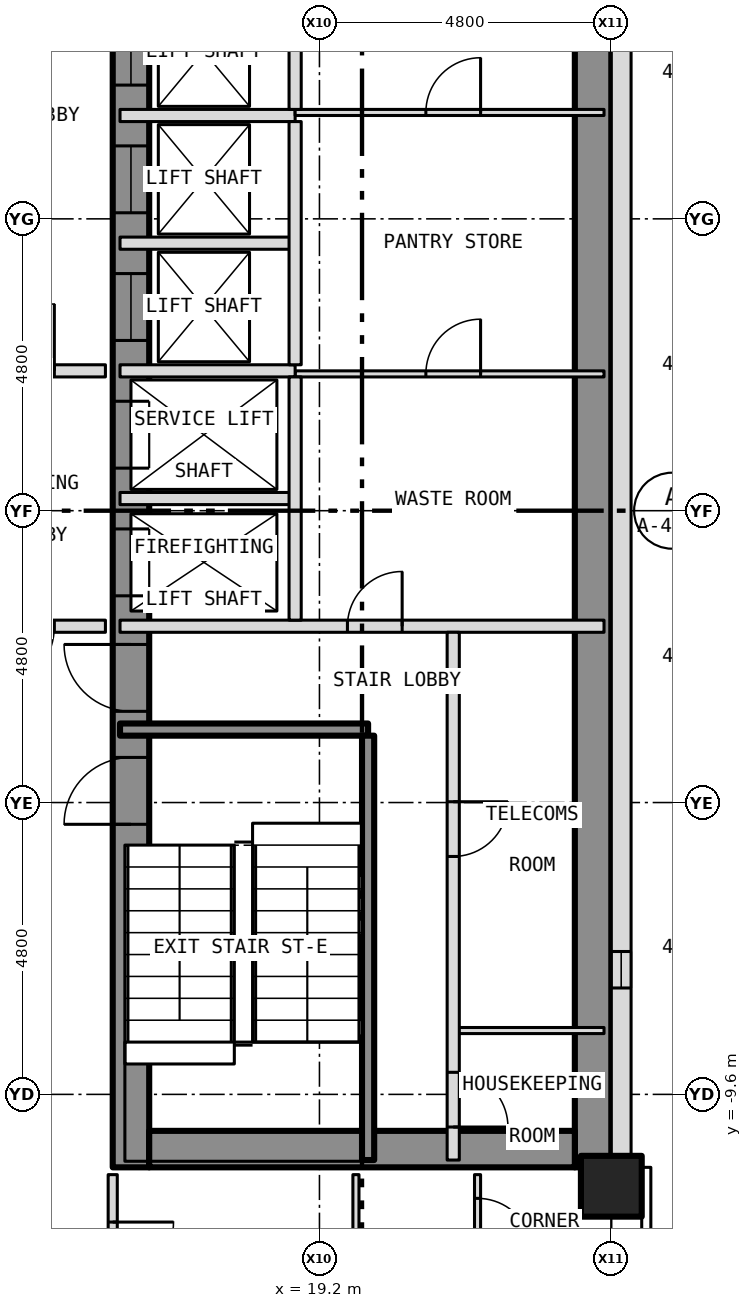
"""IFC4 building model, lengths in metres.
Left out: names, types, materials, properties, quantities, classifications, styles, units other than length and angle.
Written with IfcOpenShell. Run it as: python <this file> out.ifc"""

import sys

from ifc_helpers import new_model, si_unit, direction, frame, frame_2d, origin, origin_2d, place, context, subcontext, project, spatial, rectangle, hollow_rectangle, extrude, element, fill, save


model = new_model("IFC4")
c1 = context("Model", 3, precision=1e-05, world=origin(), true_north=direction((0.0, 1.0)))
c2 = subcontext(c1, "Body", "Model", "MODEL_VIEW")
j1 = project(units=[si_unit("LENGTHUNIT", "METRE"), si_unit("PLANEANGLEUNIT", "RADIAN")], contexts=[c1])
p1 = place(None, origin())
s1 = spatial("IfcSite", under=j1, at=p1, CompositionType="ELEMENT")
p2 = place(p1, origin())
s2 = spatial("IfcBuilding", under=s1, at=p2, CompositionType="ELEMENT")
p3 = place(p2, frame((0.0, 0.0, 60.0)))
s3 = spatial("IfcBuildingStorey", under=s2, at=p3, CompositionType="ELEMENT", Elevation=60.0)
p4 = place(p3, frame((24.0, -11.111, -0.15), z_axis=(0.0, 0.0, 1.0), x_axis=(1.0, 0.0, 0.0)))
e1 = element("IfcColumn", 1, at=p4, inside=s3, PredefinedType="COLUMN", context=c2, shape_type="SweptSolid", body=[
    extrude(hollow_rectangle(XDim=1.0, YDim=1.0, WallThickness=0.06, at=origin_2d()), origin(), (0.0, 0.0, 1.0), 3.5),
])
p5 = place(p3, frame((16.1, -10.8, 0.0), z_axis=(0.0, 0.0, 1.0), x_axis=(0.0, 1.0, 0.0)))
e2 = element("IfcWall", 2, at=p5, inside=s3, PredefinedType="SHEAR", context=c2, shape_type="SweptSolid", body=[
    extrude(rectangle(XDim=21.6, YDim=0.6, at=frame_2d((10.8, 0.0))), origin(), (0.0, 0.0, 1.0), 3.25),
])
p6 = place(p5, frame((9.4, 0.0, 0.0)))
e3 = element("IfcOpeningElement", 3, at=p6, cuts=e2, PredefinedType="OPENING", context=c2, shape_type="SweptSolid", body=[
    extrude(rectangle(XDim=1.1, YDim=2.1, at=frame_2d((0.55, 1.05))), frame((0.0, 0.312, 0.0), z_axis=(0.0, -1.0, 0.0), x_axis=(1.0, 0.0, 0.0)), (0.0, 0.0, 1.0), 0.624),
])
p7 = place(p5, frame((11.5, 0.0, 0.0)))
e4 = element("IfcOpeningElement", 4, at=p7, cuts=e2, PredefinedType="OPENING", context=c2, shape_type="SweptSolid", body=[
    extrude(rectangle(XDim=1.1, YDim=2.1, at=frame_2d((0.55, 1.05))), frame((0.0, 0.312, 0.0), z_axis=(0.0, -1.0, 0.0), x_axis=(1.0, 0.0, 0.0)), (0.0, 0.0, 1.0), 0.624),
])
p8 = place(p5, frame((13.6, 0.0, 0.0)))
e5 = element("IfcOpeningElement", 5, at=p8, cuts=e2, PredefinedType="OPENING", context=c2, shape_type="SweptSolid", body=[
    extrude(rectangle(XDim=1.1, YDim=2.1, at=frame_2d((0.55, 1.05))), frame((0.0, 0.312, 0.0), z_axis=(0.0, -1.0, 0.0), x_axis=(1.0, 0.0, 0.0)), (0.0, 0.0, 1.0), 0.624),
])
p9 = place(p5, frame((15.7, 0.0, 0.0)))
e6 = element("IfcOpeningElement", 6, at=p9, cuts=e2, PredefinedType="OPENING", context=c2, shape_type="SweptSolid", body=[
    extrude(rectangle(XDim=1.1, YDim=2.1, at=frame_2d((0.55, 1.05))), frame((0.0, 0.312, 0.0), z_axis=(0.0, -1.0, 0.0), x_axis=(1.0, 0.0, 0.0)), (0.0, 0.0, 1.0), 0.624),
])
p10 = place(p5, frame((17.8, 0.0, 0.0)))
e7 = element("IfcOpeningElement", 7, at=p10, cuts=e2, PredefinedType="OPENING", context=c2, shape_type="SweptSolid", body=[
    extrude(rectangle(XDim=1.1, YDim=2.1, at=frame_2d((0.55, 1.05))), frame((0.0, 0.312, 0.0), z_axis=(0.0, -1.0, 0.0), x_axis=(1.0, 0.0, 0.0)), (0.0, 0.0, 1.0), 0.624),
])
p11 = place(p5, frame((5.642, 0.0, 0.0)))
e8 = element("IfcOpeningElement", 8, at=p11, cuts=e2, PredefinedType="OPENING", context=c2, shape_type="SweptSolid", body=[
    extrude(rectangle(XDim=1.1, YDim=2.1, at=frame_2d((0.55, 1.05))), frame((0.0, 0.312, 0.0), z_axis=(0.0, -1.0, 0.0), x_axis=(1.0, 0.0, 0.0)), (0.0, 0.0, 1.0), 0.624),
])
p12 = place(p5, frame((7.5, 0.0, 0.0)))
e9 = element("IfcOpeningElement", 9, at=p12, cuts=e2, PredefinedType="OPENING", context=c2, shape_type="SweptSolid", body=[
    extrude(rectangle(XDim=1.1, YDim=2.1, at=frame_2d((0.55, 1.05))), frame((0.0, 0.312, 0.0), z_axis=(0.0, -1.0, 0.0), x_axis=(1.0, 0.0, 0.0)), (0.0, 0.0, 1.0), 0.624),
])
p13 = place(p3, frame((23.7, -10.8, 0.0), z_axis=(0.0, 0.0, 1.0), x_axis=(0.0, 1.0, 0.0)))
e10 = element("IfcWall", 10, at=p13, inside=s3, PredefinedType="SHEAR", context=c2, shape_type="SweptSolid", body=[
    extrude(rectangle(XDim=21.6, YDim=0.6, at=frame_2d((10.8, 0.0))), origin(), (0.0, 0.0, 1.0), 3.25),
])
p14 = place(p3, frame((16.4, -10.5, 0.0), z_axis=(0.0, 0.0, 1.0), x_axis=(1.0, 0.0, 0.0)))
e11 = element("IfcWall", 11, at=p14, inside=s3, PredefinedType="SHEAR", context=c2, shape_type="SweptSolid", body=[
    extrude(rectangle(XDim=7.0, YDim=0.6, at=frame_2d((3.5, 0.0))), origin(), (0.0, 0.0, 1.0), 3.25),
])
p15 = place(p3, frame((24.163, -10.8, 0.0), z_axis=(0.0, 0.0, 1.0), x_axis=(0.0, 1.0, 0.0)))
e12 = element("IfcWall", 12, at=p15, inside=s3, PredefinedType="SOLIDWALL", context=c2, shape_type="SweptSolid", body=[
    extrude(rectangle(XDim=21.6, YDim=0.325, at=frame_2d((10.8, 0.0))), origin(), (0.0, 0.0, 1.0), 3.5),
])
p16 = place(p15, frame((2.95, 0.0, 1.0)))
e13 = element("IfcOpeningElement", 13, at=p16, cuts=e12, PredefinedType="OPENING", context=c2, shape_type="SweptSolid", body=[
    extrude(rectangle(XDim=0.6, YDim=1.5, at=frame_2d((0.3, 0.75))), frame((0.0, 0.175, 0.0), z_axis=(0.0, -1.0, 0.0), x_axis=(1.0, 0.0, 0.0)), (0.0, 0.0, 1.0), 0.349),
])
p17 = place(p3, frame((21.4, -8.55, 0.0), z_axis=(0.0, 0.0, 1.0), x_axis=(1.0, 0.0, 0.0)))
e14 = element("IfcWall", 14, at=p17, inside=s3, PredefinedType="PARTITIONING", context=c2, shape_type="SweptSolid", body=[
    extrude(rectangle(XDim=2.48, YDim=0.1, at=frame_2d((1.24, 0.0))), origin(), (0.0, 0.0, 1.0), 3.25),
])
p18 = place(p3, frame((15.92, -3.6, 0.0), z_axis=(0.0, 0.0, 1.0), x_axis=(1.0, 0.0, 0.0)))
e15 = element("IfcWall", 15, at=p18, inside=s3, PredefinedType="SHEAR", context=c2, shape_type="SweptSolid", body=[
    extrude(rectangle(XDim=4.08, YDim=0.2, at=frame_2d((2.04, 0.0))), origin(), (0.0, 0.0, 1.0), 3.25),
])
p19 = place(p3, frame((12.4, -1.9, 0.0), z_axis=(0.0, 0.0, 1.0), x_axis=(1.0, 0.0, 0.0)))
e16 = element("IfcWall", 16, at=p19, inside=s3, PredefinedType="PARTITIONING", context=c2, shape_type="SweptSolid", body=[
    extrude(rectangle(XDim=3.28, YDim=0.2, at=frame_2d((1.64, 0.0))), origin(), (0.0, 0.0, 1.0), 3.35),
])
p20 = place(p19, frame((1.34, 0.0, 0.0)))
e17 = element("IfcOpeningElement", 17, at=p20, cuts=e16, PredefinedType="OPENING", context=c2, shape_type="SweptSolid", body=[
    extrude(rectangle(XDim=1.1, YDim=2.1, at=frame_2d((0.55, 1.05))), frame((0.0, 0.112, 0.0), z_axis=(0.0, -1.0, 0.0), x_axis=(1.0, 0.0, 0.0)), (0.0, 0.0, 1.0), 0.224),
])
p21 = place(p3, frame((15.92, -1.9, 0.0), z_axis=(0.0, 0.0, 1.0), x_axis=(1.0, 0.0, 0.0)))
e18 = element("IfcWall", 18, at=p21, inside=s3, PredefinedType="PARTITIONING", context=c2, shape_type="SweptSolid", body=[
    extrude(rectangle(XDim=7.96, YDim=0.2, at=frame_2d((3.98, 0.0))), origin(), (0.0, 0.0, 1.0), 3.25),
])
p22 = place(p21, frame((3.74, 0.0, 0.0)))
e19 = element("IfcOpeningElement", 19, at=p22, cuts=e18, PredefinedType="OPENING", context=c2, shape_type="SweptSolid", body=[
    extrude(rectangle(XDim=0.9, YDim=2.1, at=frame_2d((0.45, 1.05))), frame((0.0, 0.112, 0.0), z_axis=(0.0, -1.0, 0.0), x_axis=(1.0, 0.0, 0.0)), (0.0, 0.0, 1.0), 0.224),
])
p23 = place(p3, frame((15.92, 0.2, 0.0), z_axis=(0.0, 0.0, 1.0), x_axis=(1.0, 0.0, 0.0)))
e20 = element("IfcWall", 20, at=p23, inside=s3, PredefinedType="PARTITIONING", context=c2, shape_type="SweptSolid", body=[
    extrude(rectangle(XDim=2.88, YDim=0.2, at=frame_2d((1.44, 0.0))), origin(), (0.0, 0.0, 1.0), 3.25),
])
p24 = place(p3, frame((18.8, 2.25, 0.0), z_axis=(0.0, 0.0, 1.0), x_axis=(1.0, 0.0, 0.0)))
e21 = element("IfcWall", 21, at=p24, inside=s3, PredefinedType="PARTITIONING", context=c2, shape_type="SweptSolid", body=[
    extrude(rectangle(XDim=5.08, YDim=0.1, at=frame_2d((2.54, 0.0))), origin(), (0.0, 0.0, 1.0), 3.25),
])
p25 = place(p24, frame((2.15, 0.0, 0.0)))
e22 = element("IfcOpeningElement", 22, at=p25, cuts=e21, PredefinedType="OPENING", context=c2, shape_type="SweptSolid", body=[
    extrude(rectangle(XDim=0.9, YDim=2.1, at=frame_2d((0.45, 1.05))), frame((0.0, 0.062, 0.0), z_axis=(0.0, -1.0, 0.0), x_axis=(1.0, 0.0, 0.0)), (0.0, 0.0, 1.0), 0.124),
])
p26 = place(p3, frame((12.4, 2.3, 0.0), z_axis=(0.0, 0.0, 1.0), x_axis=(1.0, 0.0, 0.0)))
e23 = element("IfcWall", 23, at=p26, inside=s3, PredefinedType="PARTITIONING", context=c2, shape_type="SweptSolid", body=[
    extrude(rectangle(XDim=3.28, YDim=0.2, at=frame_2d((1.64, 0.0))), origin(), (0.0, 0.0, 1.0), 3.35),
])
p27 = place(p26, frame((1.34, 0.0, 0.0)))
e24 = element("IfcOpeningElement", 24, at=p27, cuts=e23, PredefinedType="OPENING", context=c2, shape_type="SweptSolid", body=[
    extrude(rectangle(XDim=1.1, YDim=2.1, at=frame_2d((0.55, 1.05))), frame((0.0, 0.112, 0.0), z_axis=(0.0, -1.0, 0.0), x_axis=(1.0, 0.0, 0.0)), (0.0, 0.0, 1.0), 0.224),
])
for number, where, z_axis, x_axis in (
    (25, (15.92, 2.3, 0.0), (0.0, 0.0, 1.0), (1.0, 0.0, 0.0)),
    (26, (15.92, 4.4, 0.0), (0.0, 0.0, 1.0), (1.0, 0.0, 0.0)),
    (27, (15.92, 6.5, 0.0), (0.0, 0.0, 1.0), (1.0, 0.0, 0.0)),
):
    element("IfcWall", number, at=place(p3, frame(where, z_axis=z_axis, x_axis=x_axis)), inside=s3, PredefinedType="PARTITIONING", context=c2, shape_type="SweptSolid", body=[
        extrude(rectangle(XDim=2.88, YDim=0.2, at=frame_2d((1.44, 0.0))), origin(), (0.0, 0.0, 1.0), 3.25),
    ])
p28 = place(p3, frame((18.8, 6.55, 0.0), z_axis=(0.0, 0.0, 1.0), x_axis=(1.0, 0.0, 0.0)))
e28 = element("IfcWall", 28, at=p28, inside=s3, PredefinedType="PARTITIONING", context=c2, shape_type="SweptSolid", body=[
    extrude(rectangle(XDim=5.08, YDim=0.1, at=frame_2d((2.54, 0.0))), origin(), (0.0, 0.0, 1.0), 3.25),
])
p29 = place(p28, frame((2.15, 0.0, 0.0)))
e29 = element("IfcOpeningElement", 29, at=p29, cuts=e28, PredefinedType="OPENING", context=c2, shape_type="SweptSolid", body=[
    extrude(rectangle(XDim=0.9, YDim=2.1, at=frame_2d((0.45, 1.05))), frame((0.0, 0.062, 0.0), z_axis=(0.0, -1.0, 0.0), x_axis=(1.0, 0.0, 0.0)), (0.0, 0.0, 1.0), 0.124),
])
p30 = place(p3, frame((15.8, -15.725, 0.0), z_axis=(0.0, 0.0, 1.0), x_axis=(0.0, 1.0, 0.0)))
e30 = element("IfcWall", 30, at=p30, inside=s3, PredefinedType="PARTITIONING", context=c2, shape_type="SweptSolid", body=[
    extrude(rectangle(XDim=4.805, YDim=0.15, at=frame_2d((2.403, 0.0))), origin(), (0.0, 0.0, 1.0), 3.35),
])
p31 = place(p30, frame((3.025, 0.0, 0.0)))
e31 = element("IfcOpeningElement", 31, at=p31, cuts=e30, PredefinedType="OPENING", context=c2, shape_type="SweptSolid", body=[
    extrude(rectangle(XDim=1.0, YDim=2.1, at=frame_2d((0.5, 1.05))), frame((0.0, 0.087, 0.0), z_axis=(0.0, -1.0, 0.0), x_axis=(1.0, 0.0, 0.0)), (0.0, 0.0, 1.0), 0.174),
])
for number, where, z_axis, x_axis in (
    (32, (18.8, -1.8, 0.0), (0.0, 0.0, 1.0), (0.0, 1.0, 0.0)),
    (33, (18.8, 2.4, 0.0), (0.0, 0.0, 1.0), (0.0, 1.0, 0.0)),
):
    element("IfcWall", number, at=place(p3, frame(where, z_axis=z_axis, x_axis=x_axis)), inside=s3, PredefinedType="PARTITIONING", context=c2, shape_type="SweptSolid", body=[
        extrude(rectangle(XDim=4.0, YDim=0.2, at=frame_2d((2.0, 0.0))), origin(), (0.0, 0.0, 1.0), 3.25),
    ])
p32 = place(p3, frame((18.8, 6.6, 0.0), z_axis=(0.0, 0.0, 1.0), x_axis=(0.0, 1.0, 0.0)))
e34 = element("IfcWall", 34, at=p32, inside=s3, PredefinedType="PARTITIONING", context=c2, shape_type="SweptSolid", body=[
    extrude(rectangle(XDim=4.08, YDim=0.2, at=frame_2d((2.04, 0.0))), origin(), (0.0, 0.0, 1.0), 3.25),
])
p33 = place(p3, frame((19.8, -23.88, 0.0), z_axis=(0.0, 0.0, 1.0), x_axis=(0.0, 1.0, 0.0)))
e35 = element("IfcWall", 35, at=p33, inside=s3, PredefinedType="PARTITIONING", context=c2, shape_type="SweptSolid", body=[
    extrude(rectangle(XDim=12.96, YDim=0.1, at=frame_2d((6.48, 0.0))), origin(), (0.0, 0.0, 1.0), 3.35),
])
p34 = place(p33, frame((6.03, 0.0, 0.0)))
e36 = element("IfcOpeningElement", 36, at=p34, cuts=e35, PredefinedType="OPENING", context=c2, shape_type="SweptSolid", body=[
    extrude(rectangle(XDim=0.9, YDim=2.1, at=frame_2d((0.45, 1.05))), frame((0.0, 0.062, 0.0), z_axis=(0.0, -1.0, 0.0), x_axis=(1.0, 0.0, 0.0)), (0.0, 0.0, 1.0), 0.124),
])
p35 = place(p3, frame((20.0, -10.68, 0.0), z_axis=(0.0, 0.0, 1.0), x_axis=(0.0, 1.0, 0.0)))
e37 = element("IfcWall", 37, at=p35, inside=s3, PredefinedType="SHEAR", context=c2, shape_type="SweptSolid", body=[
    extrude(rectangle(XDim=6.98, YDim=0.2, at=frame_2d((3.49, 0.0))), origin(), (0.0, 0.0, 1.0), 3.25),
])
p36 = place(p3, frame((21.4, -10.68, 0.0), z_axis=(0.0, 0.0, 1.0), x_axis=(0.0, 1.0, 0.0)))
e38 = element("IfcWall", 38, at=p36, inside=s3, PredefinedType="PARTITIONING", context=c2, shape_type="SweptSolid", body=[
    extrude(rectangle(XDim=8.68, YDim=0.2, at=frame_2d((4.34, 0.0))), origin(), (0.0, 0.0, 1.0), 3.25),
])
p37 = place(p36, frame((0.543, 0.0, 0.0)))
e39 = element("IfcOpeningElement", 39, at=p37, cuts=e38, PredefinedType="OPENING", context=c2, shape_type="SweptSolid", body=[
    extrude(rectangle(XDim=0.9, YDim=2.1, at=frame_2d((0.45, 1.05))), frame((0.0, 0.112, 0.0), z_axis=(0.0, -1.0, 0.0), x_axis=(1.0, 0.0, 0.0)), (0.0, 0.0, 1.0), 0.224),
])
p38 = place(p36, frame((4.993, 0.0, 0.0)))
e40 = element("IfcOpeningElement", 40, at=p38, cuts=e38, PredefinedType="OPENING", context=c2, shape_type="SweptSolid", body=[
    extrude(rectangle(XDim=0.9, YDim=2.1, at=frame_2d((0.45, 1.05))), frame((0.0, 0.112, 0.0), z_axis=(0.0, -1.0, 0.0), x_axis=(1.0, 0.0, 0.0)), (0.0, 0.0, 1.0), 0.224),
])
p39 = place(p3, frame((21.8, -13.95, 0.0), z_axis=(0.0, 0.0, 1.0), x_axis=(0.0, 1.0, 0.0)))
e41 = element("IfcWall", 41, at=p39, inside=s3, PredefinedType="PARTITIONING", context=c2, shape_type="SweptSolid", body=[
    extrude(rectangle(XDim=3.03, YDim=0.1, at=frame_2d((1.515, 0.0))), origin(), (0.0, 0.0, 1.0), 3.35),
])
p40 = place(p39, frame((1.74, 0.0, 0.0)))
e42 = element("IfcOpeningElement", 42, at=p40, cuts=e41, PredefinedType="OPENING", context=c2, shape_type="SweptSolid", body=[
    extrude(rectangle(XDim=0.9, YDim=2.1, at=frame_2d((0.45, 1.05))), frame((0.0, 0.062, 0.0), z_axis=(0.0, -1.0, 0.0), x_axis=(1.0, 0.0, 0.0)), (0.0, 0.0, 1.0), 0.124),
])
p41 = place(p16, origin())
e43 = element("IfcWindow", 43, at=p41, inside=s3, PartitioningType="SINGLE_PANEL", PredefinedType="WINDOW", context=c2, shape_type="SweptSolid", body=[
    extrude(rectangle(XDim=0.6, YDim=1.5, at=frame_2d((0.3, 0.75))), frame((0.0, -0.073, 0.0), z_axis=(0.0, -1.0, 0.0), x_axis=(1.0, 0.0, 0.0)), (0.0, 0.0, 1.0), 0.06),
])
fill(e13, e43)
p42 = place(p6, origin())
e44 = element("IfcDoor", 44, at=p42, inside=s3, OperationType="SLIDING_TO_LEFT", PredefinedType="DOOR", context=c2, shape_type="SweptSolid", body=[
    extrude(rectangle(XDim=1.1, YDim=2.1, at=frame_2d((0.55, 1.05))), frame((0.0, 0.025, 0.0), z_axis=(0.0, -1.0, 0.0), x_axis=(1.0, 0.0, 0.0)), (0.0, 0.0, 1.0), 0.05),
])
fill(e3, e44)
p43 = place(p7, origin())
e45 = element("IfcDoor", 45, at=p43, inside=s3, OperationType="SLIDING_TO_LEFT", PredefinedType="DOOR", context=c2, shape_type="SweptSolid", body=[
    extrude(rectangle(XDim=1.1, YDim=2.1, at=frame_2d((0.55, 1.05))), frame((0.0, 0.025, 0.0), z_axis=(0.0, -1.0, 0.0), x_axis=(1.0, 0.0, 0.0)), (0.0, 0.0, 1.0), 0.05),
])
fill(e4, e45)
p44 = place(p8, origin())
e46 = element("IfcDoor", 46, at=p44, inside=s3, OperationType="SLIDING_TO_LEFT", PredefinedType="DOOR", context=c2, shape_type="SweptSolid", body=[
    extrude(rectangle(XDim=1.1, YDim=2.1, at=frame_2d((0.55, 1.05))), frame((0.0, 0.025, 0.0), z_axis=(0.0, -1.0, 0.0), x_axis=(1.0, 0.0, 0.0)), (0.0, 0.0, 1.0), 0.05),
])
fill(e5, e46)
p45 = place(p9, origin())
e47 = element("IfcDoor", 47, at=p45, inside=s3, OperationType="SLIDING_TO_LEFT", PredefinedType="DOOR", context=c2, shape_type="SweptSolid", body=[
    extrude(rectangle(XDim=1.1, YDim=2.1, at=frame_2d((0.55, 1.05))), frame((0.0, 0.025, 0.0), z_axis=(0.0, -1.0, 0.0), x_axis=(1.0, 0.0, 0.0)), (0.0, 0.0, 1.0), 0.05),
])
fill(e6, e47)
p46 = place(p10, origin())
e48 = element("IfcDoor", 48, at=p46, inside=s3, OperationType="SLIDING_TO_LEFT", PredefinedType="DOOR", context=c2, shape_type="SweptSolid", body=[
    extrude(rectangle(XDim=1.1, YDim=2.1, at=frame_2d((0.55, 1.05))), frame((0.0, 0.025, 0.0), z_axis=(0.0, -1.0, 0.0), x_axis=(1.0, 0.0, 0.0)), (0.0, 0.0, 1.0), 0.05),
])
fill(e7, e48)
p47 = place(p11, origin())
e49 = element("IfcDoor", 49, at=p47, inside=s3, OperationType="SINGLE_SWING_LEFT", PredefinedType="DOOR", context=c2, shape_type="SweptSolid", body=[
    extrude(rectangle(XDim=1.1, YDim=2.1, at=frame_2d((0.55, 1.05))), frame((0.0, 0.025, 0.0), z_axis=(0.0, -1.0, 0.0), x_axis=(1.0, 0.0, 0.0)), (0.0, 0.0, 1.0), 0.05),
])
fill(e8, e49)
p48 = place(p12, origin())
e50 = element("IfcDoor", 50, at=p48, inside=s3, OperationType="SINGLE_SWING_RIGHT", PredefinedType="DOOR", context=c2, shape_type="SweptSolid", body=[
    extrude(rectangle(XDim=1.1, YDim=2.1, at=frame_2d((0.55, 1.05))), frame((0.0, 0.025, 0.0), z_axis=(0.0, -1.0, 0.0), x_axis=(1.0, 0.0, 0.0)), (0.0, 0.0, 1.0), 0.05),
])
fill(e9, e50)
p49 = place(p37, origin())
e51 = element("IfcDoor", 51, at=p49, inside=s3, OperationType="SINGLE_SWING_LEFT", PredefinedType="DOOR", context=c2, shape_type="SweptSolid", body=[
    extrude(rectangle(XDim=0.9, YDim=2.1, at=frame_2d((0.45, 1.05))), frame((0.0, 0.025, 0.0), z_axis=(0.0, -1.0, 0.0), x_axis=(1.0, 0.0, 0.0)), (0.0, 0.0, 1.0), 0.05),
])
fill(e39, e51)
p50 = place(p38, origin())
e52 = element("IfcDoor", 52, at=p50, inside=s3, OperationType="SINGLE_SWING_RIGHT", PredefinedType="DOOR", context=c2, shape_type="SweptSolid", body=[
    extrude(rectangle(XDim=0.9, YDim=2.1, at=frame_2d((0.45, 1.05))), frame((0.0, 0.025, 0.0), z_axis=(0.0, -1.0, 0.0), x_axis=(1.0, 0.0, 0.0)), (0.0, 0.0, 1.0), 0.05),
])
fill(e40, e52)
p51 = place(p22, origin())
e53 = element("IfcDoor", 53, at=p51, inside=s3, OperationType="SINGLE_SWING_RIGHT", PredefinedType="DOOR", context=c2, shape_type="SweptSolid", body=[
    extrude(rectangle(XDim=0.9, YDim=2.1, at=frame_2d((0.45, 1.05))), frame((0.0, 0.025, 0.0), z_axis=(0.0, -1.0, 0.0), x_axis=(1.0, 0.0, 0.0)), (0.0, 0.0, 1.0), 0.05),
])
fill(e19, e53)
p52 = place(p25, origin())
e54 = element("IfcDoor", 54, at=p52, inside=s3, OperationType="SINGLE_SWING_RIGHT", PredefinedType="DOOR", context=c2, shape_type="SweptSolid", body=[
    extrude(rectangle(XDim=0.9, YDim=2.1, at=frame_2d((0.45, 1.05))), frame((0.0, 0.025, 0.0), z_axis=(0.0, -1.0, 0.0), x_axis=(1.0, 0.0, 0.0)), (0.0, 0.0, 1.0), 0.05),
])
fill(e22, e54)
p53 = place(p29, origin())
e55 = element("IfcDoor", 55, at=p53, inside=s3, OperationType="SINGLE_SWING_RIGHT", PredefinedType="DOOR", context=c2, shape_type="SweptSolid", body=[
    extrude(rectangle(XDim=0.9, YDim=2.1, at=frame_2d((0.45, 1.05))), frame((0.0, 0.025, 0.0), z_axis=(0.0, -1.0, 0.0), x_axis=(1.0, 0.0, 0.0)), (0.0, 0.0, 1.0), 0.05),
])
fill(e29, e55)
p54 = place(p27, origin())
e56 = element("IfcDoor", 56, at=p54, inside=s3, OperationType="SINGLE_SWING_RIGHT", PredefinedType="DOOR", context=c2, shape_type="SweptSolid", body=[
    extrude(rectangle(XDim=1.1, YDim=2.1, at=frame_2d((0.55, 1.05))), frame((0.0, 0.025, 0.0), z_axis=(0.0, -1.0, 0.0), x_axis=(1.0, 0.0, 0.0)), (0.0, 0.0, 1.0), 0.05),
])
fill(e24, e56)
p55 = place(p20, origin())
e57 = element("IfcDoor", 57, at=p55, inside=s3, OperationType="SINGLE_SWING_LEFT", PredefinedType="DOOR", context=c2, shape_type="SweptSolid", body=[
    extrude(rectangle(XDim=1.1, YDim=2.1, at=frame_2d((0.55, 1.05))), frame((0.0, 0.025, 0.0), z_axis=(0.0, -1.0, 0.0), x_axis=(1.0, 0.0, 0.0)), (0.0, 0.0, 1.0), 0.05),
])
fill(e17, e57)
p56 = place(p31, origin())
e58 = element("IfcDoor", 58, at=p56, inside=s3, OperationType="SINGLE_SWING_RIGHT", PredefinedType="DOOR", context=c2, shape_type="SweptSolid", body=[
    extrude(rectangle(XDim=1.0, YDim=2.1, at=frame_2d((0.5, 1.05))), frame((0.0, 0.025, 0.0), z_axis=(0.0, -1.0, 0.0), x_axis=(1.0, 0.0, 0.0)), (0.0, 0.0, 1.0), 0.05),
])
fill(e31, e58)
p57 = place(p40, origin())
e59 = element("IfcDoor", 59, at=p57, inside=s3, OperationType="SINGLE_SWING_LEFT", PredefinedType="DOOR", context=c2, shape_type="SweptSolid", body=[
    extrude(rectangle(XDim=0.9, YDim=2.1, at=frame_2d((0.45, 1.05))), frame((0.0, 0.025, 0.0), z_axis=(0.0, -1.0, 0.0), x_axis=(1.0, 0.0, 0.0)), (0.0, 0.0, 1.0), 0.05),
])
fill(e42, e59)
save(model, sys.argv[1])
